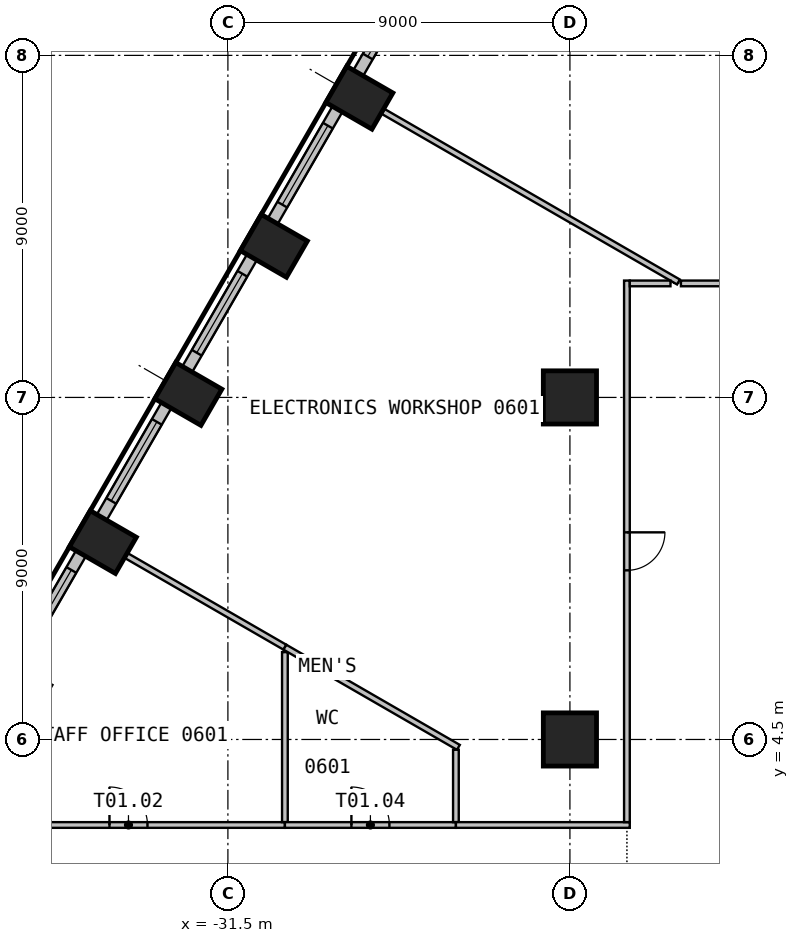
"""IFC4 building model, lengths in metres.
Left out: names, types, materials, properties, quantities, classifications, styles, units other than length and angle.
Written with IfcOpenShell. Run it as: python <this file> out.ifc"""

import sys

from ifc_helpers import new_model, si_unit, direction, frame, frame_2d, origin, origin_2d, place, context, subcontext, project, spatial, rectangle, circle, extrude, element, fill, save


model = new_model("IFC4")
c1 = context("Model", 3, precision=1e-05, world=origin(), true_north=direction((0.0, 1.0)))
c2 = subcontext(c1, "Body", "Model", "MODEL_VIEW")
j1 = project(units=[si_unit("LENGTHUNIT", "METRE"), si_unit("PLANEANGLEUNIT", "RADIAN")], contexts=[c1])
p1 = place(None, origin())
s1 = spatial("IfcSite", under=j1, at=p1, CompositionType="ELEMENT")
p2 = place(p1, origin())
s2 = spatial("IfcBuilding", under=s1, at=p2, CompositionType="ELEMENT")
p3 = place(p2, frame((0.0, 0.0, 30.0)))
s3 = spatial("IfcBuildingStorey", under=s2, at=p3, CompositionType="ELEMENT", Elevation=30.0)
for number, where, z_axis, x_axis in (
    (1, (-28.041, 21.385, 0.0), (0.0, 0.0, 1.0), (-0.5, -0.866, 0.0)),
    (2, (-30.291, 17.489, 0.0), (0.0, 0.0, 1.0), (-0.5, -0.866, 0.0)),
    (3, (-32.541, 13.591, 0.0), (0.0, 0.0, 1.0), (-0.5, -0.866, 0.0)),
    (4, (-34.791, 9.694, 0.0), (0.0, 0.0, 1.0), (-0.5, -0.866, 0.0)),
):
    element("IfcColumn", number, at=place(p3, frame(where, z_axis=z_axis, x_axis=x_axis)), inside=s3, PredefinedType="COLUMN", context=c2, shape_type="SweptSolid", body=[
        extrude(rectangle(XDim=1.1, YDim=1.4, at=origin_2d()), origin(), (0.0, 0.0, 1.0), 3.525),
    ])
for number, where, z_axis, x_axis in (
    (5, (-22.5, 4.5, 0.0), (0.0, 0.0, 1.0), (1.0, 0.0, 0.0)),
    (6, (-22.5, 13.5, 0.0), (0.0, 0.0, 1.0), (1.0, 0.0, 0.0)),
):
    element("IfcColumn", number, at=place(p3, frame(where, z_axis=z_axis, x_axis=x_axis)), inside=s3, PredefinedType="COLUMN", context=c2, shape_type="SweptSolid", body=[
        extrude(circle(Radius=0.7, at=origin_2d()), origin(), (0.0, 0.0, 1.0), 3.525),
    ])
p4 = place(p3, frame((-26.369, 24.981, 0.0), z_axis=(0.0, 0.0, 1.0), x_axis=(-0.499993955907, -0.866028893315, 0.0)))
e7 = element("IfcWall", 7, at=p4, inside=s3, PredefinedType="SOLIDWALL", context=c2, shape_type="SweptSolid", body=[
    extrude(rectangle(XDim=3.399, YDim=0.3, at=frame_2d((1.699, 0.0))), origin(), (0.0, 0.0, 1.0), 3.525),
])
p5 = place(p4, frame((0.5, 0.0, 0.9)))
e8 = element("IfcOpeningElement", 8, at=p5, cuts=e7, PredefinedType="OPENING", context=c2, shape_type="SweptSolid", body=[
    extrude(rectangle(XDim=2.4, YDim=2.1, at=frame_2d((1.2, 1.05))), frame((0.0, 0.16, 0.0), z_axis=(0.0, -1.0, 0.0), x_axis=(1.0, 0.0, 0.0)), (0.0, 0.0, 1.0), 0.32),
])
p6 = place(p3, frame((-28.619, 21.084, 0.0), z_axis=(0.0, 0.0, 1.0), x_axis=(-0.499993955907, -0.866028893315, 0.0)))
e9 = element("IfcWall", 9, at=p6, inside=s3, PredefinedType="SOLIDWALL", context=c2, shape_type="SweptSolid", body=[
    extrude(rectangle(XDim=3.399, YDim=0.3, at=frame_2d((1.699, 0.0))), origin(), (0.0, 0.0, 1.0), 3.525),
])
p7 = place(p6, frame((0.5, 0.0, 0.9)))
e10 = element("IfcOpeningElement", 10, at=p7, cuts=e9, PredefinedType="OPENING", context=c2, shape_type="SweptSolid", body=[
    extrude(rectangle(XDim=2.4, YDim=2.1, at=frame_2d((1.2, 1.05))), frame((0.0, 0.16, 0.0), z_axis=(0.0, -1.0, 0.0), x_axis=(1.0, 0.0, 0.0)), (0.0, 0.0, 1.0), 0.32),
])
p8 = place(p3, frame((-30.869, 17.187, 0.0), z_axis=(0.0, 0.0, 1.0), x_axis=(-0.499993955907, -0.866028893315, 0.0)))
e11 = element("IfcWall", 11, at=p8, inside=s3, PredefinedType="SOLIDWALL", context=c2, shape_type="SweptSolid", body=[
    extrude(rectangle(XDim=3.399, YDim=0.3, at=frame_2d((1.699, 0.0))), origin(), (0.0, 0.0, 1.0), 3.525),
])
p9 = place(p8, frame((0.5, 0.0, 0.9)))
e12 = element("IfcOpeningElement", 12, at=p9, cuts=e11, PredefinedType="OPENING", context=c2, shape_type="SweptSolid", body=[
    extrude(rectangle(XDim=2.4, YDim=2.1, at=frame_2d((1.2, 1.05))), frame((0.0, 0.16, 0.0), z_axis=(0.0, -1.0, 0.0), x_axis=(1.0, 0.0, 0.0)), (0.0, 0.0, 1.0), 0.32),
])
p10 = place(p3, frame((-33.119, 13.29, 0.0), z_axis=(0.0, 0.0, 1.0), x_axis=(-0.499993955907, -0.866028893315, 0.0)))
e13 = element("IfcWall", 13, at=p10, inside=s3, PredefinedType="SOLIDWALL", context=c2, shape_type="SweptSolid", body=[
    extrude(rectangle(XDim=3.399, YDim=0.3, at=frame_2d((1.699, 0.0))), origin(), (0.0, 0.0, 1.0), 3.525),
])
p11 = place(p10, frame((0.5, 0.0, 0.9)))
e14 = element("IfcOpeningElement", 14, at=p11, cuts=e13, PredefinedType="OPENING", context=c2, shape_type="SweptSolid", body=[
    extrude(rectangle(XDim=2.4, YDim=2.1, at=frame_2d((1.2, 1.05))), frame((0.0, 0.16, 0.0), z_axis=(0.0, -1.0, 0.0), x_axis=(1.0, 0.0, 0.0)), (0.0, 0.0, 1.0), 0.32),
])
p12 = place(p3, frame((-35.369, 9.393, 0.0), z_axis=(0.0, 0.0, 1.0), x_axis=(-0.499993955907, -0.866028893315, 0.0)))
e15 = element("IfcWall", 15, at=p12, inside=s3, PredefinedType="SOLIDWALL", context=c2, shape_type="SweptSolid", body=[
    extrude(rectangle(XDim=3.399, YDim=0.3, at=frame_2d((1.699, 0.0))), origin(), (0.0, 0.0, 1.0), 3.525),
])
p13 = place(p12, frame((0.5, 0.0, 0.9)))
e16 = element("IfcOpeningElement", 16, at=p13, cuts=e15, PredefinedType="OPENING", context=c2, shape_type="SweptSolid", body=[
    extrude(rectangle(XDim=2.4, YDim=2.1, at=frame_2d((1.2, 1.05))), frame((0.0, 0.16, 0.0), z_axis=(0.0, -1.0, 0.0), x_axis=(1.0, 0.0, 0.0)), (0.0, 0.0, 1.0), 0.32),
])
p14 = place(p3, frame((-38.233, 2.25, 0.0), z_axis=(0.0, 0.0, 1.0), x_axis=(1.0, 0.0, 0.0)))
e17 = element("IfcWall", 17, at=p14, inside=s3, PredefinedType="PARTITIONING", context=c2, shape_type="SweptSolid", body=[
    extrude(rectangle(XDim=8.233, YDim=0.15, at=frame_2d((4.116, 0.0))), origin(), (0.0, 0.0, 1.0), 3.525),
])
p15 = place(p14, frame((3.616, 0.0, 0.0)))
e18 = element("IfcOpeningElement", 18, at=p15, cuts=e17, PredefinedType="OPENING", context=c2, shape_type="SweptSolid", body=[
    extrude(rectangle(XDim=1.0, YDim=2.1, at=frame_2d((0.5, 1.05))), frame((0.0, 0.085, 0.0), z_axis=(0.0, -1.0, 0.0), x_axis=(1.0, 0.0, 0.0)), (0.0, 0.0, 1.0), 0.17),
])
p16 = place(p3, frame((-34.167, 9.334, 0.0), z_axis=(0.0, 0.0, 1.0), x_axis=(0.866011543723, -0.500024005562, 0.0)))
e19 = element("IfcWall", 19, at=p16, inside=s3, PredefinedType="PARTITIONING", context=c2, shape_type="SweptSolid", body=[
    extrude(rectangle(XDim=4.812, YDim=0.15, at=frame_2d((2.406, 0.0))), origin(), (0.0, 0.0, 1.0), 3.525),
])
p17 = place(p3, frame((-30.0, 6.798, 0.0), z_axis=(0.0, 0.0, 1.0), x_axis=(0.0, -1.0, 0.0)))
e20 = element("IfcWall", 20, at=p17, inside=s3, PredefinedType="PARTITIONING", context=c2, shape_type="SweptSolid", body=[
    extrude(rectangle(XDim=4.473, YDim=0.15, at=frame_2d((2.237, 0.0))), origin(), (0.0, 0.0, 1.0), 3.525),
])
p18 = place(p3, frame((-30.0, 2.25, 0.0), z_axis=(0.0, 0.0, 1.0), x_axis=(1.0, 0.0, 0.0)))
e21 = element("IfcWall", 21, at=p18, inside=s3, PredefinedType="PARTITIONING", context=c2, shape_type="SweptSolid", body=[
    extrude(rectangle(XDim=4.5, YDim=0.15, at=frame_2d((2.25, 0.0))), origin(), (0.0, 0.0, 1.0), 3.525),
])
p19 = place(p18, frame((1.75, 0.0, 0.0)))
e22 = element("IfcOpeningElement", 22, at=p19, cuts=e21, PredefinedType="OPENING", context=c2, shape_type="SweptSolid", body=[
    extrude(rectangle(XDim=1.0, YDim=2.1, at=frame_2d((0.5, 1.05))), frame((0.0, 0.085, 0.0), z_axis=(0.0, -1.0, 0.0), x_axis=(1.0, 0.0, 0.0)), (0.0, 0.0, 1.0), 0.17),
])
p20 = place(p3, frame((-30.0, 6.928, 0.0), z_axis=(0.0, 0.0, 1.0), x_axis=(0.866031326857, -0.499989740797, 0.0)))
e23 = element("IfcWall", 23, at=p20, inside=s3, PredefinedType="PARTITIONING", context=c2, shape_type="SweptSolid", body=[
    extrude(rectangle(XDim=5.271, YDim=0.15, at=frame_2d((2.635, 0.0))), origin(), (0.0, 0.0, 1.0), 3.525),
])
p21 = place(p3, frame((-27.417, 21.026, 0.0), z_axis=(0.0, 0.0, 1.0), x_axis=(0.866004853516, -0.500035592419, 0.0)))
e24 = element("IfcWall", 24, at=p21, inside=s3, PredefinedType="PARTITIONING", context=c2, shape_type="SweptSolid", body=[
    extrude(rectangle(XDim=8.976, YDim=0.15, at=frame_2d((4.488, 0.0))), origin(), (0.0, 0.0, 1.0), 3.525),
])
p22 = place(p3, frame((-25.5, 4.23, 0.0), z_axis=(0.0, 0.0, 1.0), x_axis=(0.0, -1.0, 0.0)))
e25 = element("IfcWall", 25, at=p22, inside=s3, PredefinedType="PARTITIONING", context=c2, shape_type="SweptSolid", body=[
    extrude(rectangle(XDim=1.905, YDim=0.15, at=frame_2d((0.953, 0.0))), origin(), (0.0, 0.0, 1.0), 3.525),
])
p23 = place(p3, frame((-25.5, 2.25, 0.0), z_axis=(0.0, 0.0, 1.0), x_axis=(1.0, 0.0, 0.0)))
e26 = element("IfcWall", 26, at=p23, inside=s3, PredefinedType="PARTITIONING", context=c2, shape_type="SweptSolid", body=[
    extrude(rectangle(XDim=4.575, YDim=0.15, at=frame_2d((2.288, 0.0))), origin(), (0.0, 0.0, 1.0), 3.525),
])
p24 = place(p3, frame((-21.0, 16.575, 0.0), z_axis=(0.0, 0.0, 1.0), x_axis=(0.0, -1.0, 0.0)))
e27 = element("IfcWall", 27, at=p24, inside=s3, PredefinedType="PARTITIONING", context=c2, shape_type="SweptSolid", body=[
    extrude(rectangle(XDim=14.25, YDim=0.15, at=frame_2d((7.125, 0.0))), origin(), (0.0, 0.0, 1.0), 3.525),
])
p25 = place(p24, frame((6.625, 0.0, 0.0)))
e28 = element("IfcOpeningElement", 28, at=p25, cuts=e27, PredefinedType="OPENING", context=c2, shape_type="SweptSolid", body=[
    extrude(rectangle(XDim=1.0, YDim=2.1, at=frame_2d((0.5, 1.05))), frame((0.0, 0.085, 0.0), z_axis=(0.0, -1.0, 0.0), x_axis=(1.0, 0.0, 0.0)), (0.0, 0.0, 1.0), 0.17),
])
p26 = place(p3, frame((-19.854, 16.5, 0.0), z_axis=(0.0, 0.0, 1.0), x_axis=(-1.0, 0.0, 0.0)))
e29 = element("IfcWall", 29, at=p26, inside=s3, PredefinedType="PARTITIONING", context=c2, shape_type="SweptSolid", body=[
    extrude(rectangle(XDim=1.071, YDim=0.15, at=frame_2d((0.536, 0.0))), origin(), (0.0, 0.0, 1.0), 3.525),
])
p27 = place(p3, frame((-11.25, 16.5, 0.0), z_axis=(0.0, 0.0, 1.0), x_axis=(-1.0, 0.0, 0.0)))
e30 = element("IfcWall", 30, at=p27, inside=s3, PredefinedType="PARTITIONING", context=c2, shape_type="SweptSolid", body=[
    extrude(rectangle(XDim=8.329, YDim=0.15, at=frame_2d((4.165, 0.0))), origin(), (0.0, 0.0, 1.0), 3.525),
])
p28 = place(p27, frame((3.665, 0.0, 0.0)))
e31 = element("IfcOpeningElement", 31, at=p28, cuts=e30, PredefinedType="OPENING", context=c2, shape_type="SweptSolid", body=[
    extrude(rectangle(XDim=1.0, YDim=2.1, at=frame_2d((0.5, 1.05))), frame((0.0, 0.085, 0.0), z_axis=(0.0, -1.0, 0.0), x_axis=(1.0, 0.0, 0.0)), (0.0, 0.0, 1.0), 0.17),
])
p29 = place(p5, origin())
e32 = element("IfcWindow", 32, at=p29, inside=s3, PartitioningType="SINGLE_PANEL", PredefinedType="WINDOW", context=c2, shape_type="SweptSolid", body=[
    extrude(rectangle(XDim=2.4, YDim=2.1, at=frame_2d((1.2, 1.05))), frame((0.0, 0.03, 0.0), z_axis=(0.0, -1.0, 0.0), x_axis=(1.0, 0.0, 0.0)), (0.0, 0.0, 1.0), 0.06),
])
fill(e8, e32)
p30 = place(p7, origin())
e33 = element("IfcWindow", 33, at=p30, inside=s3, PartitioningType="SINGLE_PANEL", PredefinedType="WINDOW", context=c2, shape_type="SweptSolid", body=[
    extrude(rectangle(XDim=2.4, YDim=2.1, at=frame_2d((1.2, 1.05))), frame((0.0, 0.03, 0.0), z_axis=(0.0, -1.0, 0.0), x_axis=(1.0, 0.0, 0.0)), (0.0, 0.0, 1.0), 0.06),
])
fill(e10, e33)
p31 = place(p9, origin())
e34 = element("IfcWindow", 34, at=p31, inside=s3, PartitioningType="SINGLE_PANEL", PredefinedType="WINDOW", context=c2, shape_type="SweptSolid", body=[
    extrude(rectangle(XDim=2.4, YDim=2.1, at=frame_2d((1.2, 1.05))), frame((0.0, 0.03, 0.0), z_axis=(0.0, -1.0, 0.0), x_axis=(1.0, 0.0, 0.0)), (0.0, 0.0, 1.0), 0.06),
])
fill(e12, e34)
p32 = place(p11, origin())
e35 = element("IfcWindow", 35, at=p32, inside=s3, PartitioningType="SINGLE_PANEL", PredefinedType="WINDOW", context=c2, shape_type="SweptSolid", body=[
    extrude(rectangle(XDim=2.4, YDim=2.1, at=frame_2d((1.2, 1.05))), frame((0.0, 0.03, 0.0), z_axis=(0.0, -1.0, 0.0), x_axis=(1.0, 0.0, 0.0)), (0.0, 0.0, 1.0), 0.06),
])
fill(e14, e35)
p33 = place(p13, origin())
e36 = element("IfcWindow", 36, at=p33, inside=s3, PartitioningType="SINGLE_PANEL", PredefinedType="WINDOW", context=c2, shape_type="SweptSolid", body=[
    extrude(rectangle(XDim=2.4, YDim=2.1, at=frame_2d((1.2, 1.05))), frame((0.0, 0.03, 0.0), z_axis=(0.0, -1.0, 0.0), x_axis=(1.0, 0.0, 0.0)), (0.0, 0.0, 1.0), 0.06),
])
fill(e16, e36)
p34 = place(p15, origin())
e37 = element("IfcDoor", 37, at=p34, inside=s3, OperationType="SINGLE_SWING_LEFT", PredefinedType="DOOR", context=c2, shape_type="SweptSolid", body=[
    extrude(rectangle(XDim=1.0, YDim=2.1, at=frame_2d((0.5, 1.05))), frame((0.0, 0.025, 0.0), z_axis=(0.0, -1.0, 0.0), x_axis=(1.0, 0.0, 0.0)), (0.0, 0.0, 1.0), 0.05),
])
fill(e18, e37)
p35 = place(p19, origin())
e38 = element("IfcDoor", 38, at=p35, inside=s3, OperationType="SINGLE_SWING_RIGHT", PredefinedType="DOOR", context=c2, shape_type="SweptSolid", body=[
    extrude(rectangle(XDim=1.0, YDim=2.1, at=frame_2d((0.5, 1.05))), frame((0.0, 0.025, 0.0), z_axis=(0.0, -1.0, 0.0), x_axis=(1.0, 0.0, 0.0)), (0.0, 0.0, 1.0), 0.05),
])
fill(e22, e38)
p36 = place(p25, origin())
e39 = element("IfcDoor", 39, at=p36, inside=s3, OperationType="SINGLE_SWING_RIGHT", PredefinedType="DOOR", context=c2, shape_type="SweptSolid", body=[
    extrude(rectangle(XDim=1.0, YDim=2.1, at=frame_2d((0.5, 1.05))), frame((0.0, 0.025, 0.0), z_axis=(0.0, -1.0, 0.0), x_axis=(1.0, 0.0, 0.0)), (0.0, 0.0, 1.0), 0.05),
])
fill(e28, e39)
save(model, sys.argv[1])
